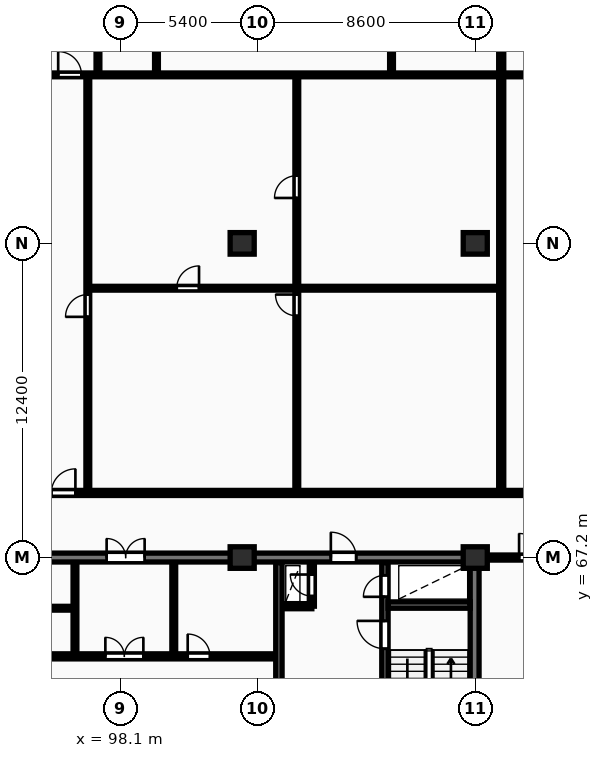
"""IFC4 building model, lengths in metres.
Left out: names, types, materials, properties, quantities, classifications, styles, units other than length and angle.
Written with IfcOpenShell. Run it as: python <this file> out.ifc"""

import sys

from ifc_helpers import new_model, si_unit, direction, frame, frame_2d, origin, origin_2d, place, context, subcontext, project, spatial, rectangle, extrude, element, fill, save


model = new_model("IFC4")
c1 = context("Model", 3, precision=1e-05, world=origin(), true_north=direction((0.0, 1.0)))
c2 = subcontext(c1, "Body", "Model", "MODEL_VIEW")
j1 = project(units=[si_unit("LENGTHUNIT", "METRE"), si_unit("PLANEANGLEUNIT", "RADIAN")], contexts=[c1])
p1 = place(None, origin())
s1 = spatial("IfcSite", under=j1, at=p1, CompositionType="ELEMENT")
p2 = place(p1, origin())
s2 = spatial("IfcBuilding", under=s1, at=p2, CompositionType="ELEMENT")
p3 = place(p2, frame((0.0, 0.0, 132.8)))
s3 = spatial("IfcBuildingStorey", under=s2, at=p3, CompositionType="ELEMENT", Elevation=132.8)
for number, where, z_axis, x_axis in (
    (1, (102.9, 67.2, 0.0), (0.0, 0.0, 1.0), (1.0, 0.0, 0.0)),
    (2, (102.9, 79.6, 0.0), (0.0, 0.0, 1.0), (1.0, 0.0, 0.0)),
    (3, (112.1, 67.2, 0.0), (0.0, 0.0, 1.0), (1.0, 0.0, 0.0)),
    (4, (112.1, 79.6, 0.0), (0.0, 0.0, 1.0), (1.0, 0.0, 0.0)),
):
    element("IfcColumn", number, at=place(p3, frame(where, z_axis=z_axis, x_axis=x_axis)), inside=s3, PredefinedType="COLUMN", context=c2, shape_type="SweptSolid", body=[
        extrude(rectangle(XDim=0.95, YDim=0.85, at=origin_2d()), origin(), (0.0, 0.0, 1.0), 3.25),
    ])
p4 = place(p3, frame((112.075, 55.375, 0.0), z_axis=(0.0, 0.0, 1.0), x_axis=(0.0, 1.0, 0.0)))
e5 = element("IfcWall", 5, at=p4, inside=s3, PredefinedType="SHEAR", context=c2, shape_type="SweptSolid", body=[
    extrude(rectangle(XDim=11.65, YDim=0.35, at=frame_2d((5.825, 0.0))), origin(), (0.0, 0.0, 1.0), 3.25),
])
p5 = place(p3, frame((75.95, 67.2, 0.0), z_axis=(0.0, 0.0, 1.0), x_axis=(1.0, 0.0, 0.0)))
e6 = element("IfcWall", 6, at=p5, inside=s3, PredefinedType="SHEAR", context=c2, shape_type="SweptSolid", body=[
    extrude(rectangle(XDim=36.3, YDim=0.35, at=frame_2d((18.15, 0.0))), origin(), (0.0, 0.0, 1.0), 3.25),
])
p6 = place(p5, frame((5.25, 0.0, 0.0)))
e7 = element("IfcOpeningElement", 7, at=p6, cuts=e6, PredefinedType="OPENING", context=c2, shape_type="SweptSolid", body=[
    extrude(rectangle(XDim=1.0, YDim=2.15, at=frame_2d((0.5, 1.075))), frame((0.0, 0.185, 0.0), z_axis=(0.0, -1.0, 0.0), x_axis=(1.0, 0.0, 0.0)), (0.0, 0.0, 1.0), 0.37),
])
p7 = place(p5, frame((21.6, 0.0, 0.0)))
e8 = element("IfcOpeningElement", 8, at=p7, cuts=e6, PredefinedType="OPENING", context=c2, shape_type="SweptSolid", body=[
    extrude(rectangle(XDim=1.5, YDim=2.2, at=frame_2d((0.75, 1.1))), frame((0.0, 0.185, 0.0), z_axis=(0.0, -1.0, 0.0), x_axis=(1.0, 0.0, 0.0)), (0.0, 0.0, 1.0), 0.37),
])
p8 = place(p5, frame((30.45, 0.0, 0.0)))
e9 = element("IfcOpeningElement", 9, at=p8, cuts=e6, PredefinedType="OPENING", context=c2, shape_type="SweptSolid", body=[
    extrude(rectangle(XDim=1.0, YDim=2.15, at=frame_2d((0.5, 1.075))), frame((0.0, 0.185, 0.0), z_axis=(0.0, -1.0, 0.0), x_axis=(1.0, 0.0, 0.0)), (0.0, 0.0, 1.0), 0.37),
])
p9 = place(p3, frame((89.25, 65.2, 0.0), z_axis=(0.0, 0.0, 1.0), x_axis=(1.0, 0.0, 0.0)))
e10 = element("IfcWall", 10, at=p9, inside=s3, PredefinedType="PARTITIONING", context=c2, shape_type="SweptSolid", body=[
    extrude(rectangle(XDim=7.05, YDim=0.15, at=frame_2d((3.525, 0.0))), origin(), (0.0, 0.0, 1.0), 2.97),
])
p10 = place(p9, frame((1.6, 0.0, 0.0)))
e11 = element("IfcOpeningElement", 11, at=p10, cuts=e10, PredefinedType="OPENING", context=c2, shape_type="SweptSolid", body=[
    extrude(rectangle(XDim=0.88, YDim=2.06, at=frame_2d((0.44, 1.03))), frame((0.0, 0.085, 0.0), z_axis=(0.0, -1.0, 0.0), x_axis=(1.0, 0.0, 0.0)), (0.0, 0.0, 1.0), 0.17),
])
for number, where, z_axis, x_axis in (
    (12, (96.3, 63.4, 0.0), (0.0, 0.0, 1.0), (0.0, 1.0, 0.0)),
    (13, (100.2, 63.4, 0.0), (0.0, 0.0, 1.0), (0.0, 1.0, 0.0)),
):
    element("IfcWall", number, at=place(p3, frame(where, z_axis=z_axis, x_axis=x_axis)), inside=s3, PredefinedType="PARTITIONING", context=c2, shape_type="SweptSolid", body=[
        extrude(rectangle(XDim=3.6, YDim=0.15, at=frame_2d((1.8, 0.0))), origin(), (0.0, 0.0, 1.0), 2.97),
    ])
p11 = place(p3, frame((84.42, 63.3, 0.0), z_axis=(0.0, 0.0, 1.0), x_axis=(1.0, 0.0, 0.0)))
e14 = element("IfcWall", 14, at=p11, inside=s3, PredefinedType="PARTITIONING", context=c2, shape_type="SweptSolid", body=[
    extrude(rectangle(XDim=19.83, YDim=0.2, at=frame_2d((9.915, 0.0))), origin(), (0.0, 0.0, 1.0), 2.97),
])
p12 = place(p11, frame((1.15, 0.0, 0.0)))
e15 = element("IfcOpeningElement", 15, at=p12, cuts=e14, PredefinedType="OPENING", context=c2, shape_type="SweptSolid", body=[
    extrude(rectangle(XDim=0.85, YDim=2.05, at=frame_2d((0.425, 1.025))), frame((0.0, 0.11, 0.0), z_axis=(0.0, -1.0, 0.0), x_axis=(1.0, 0.0, 0.0)), (0.0, 0.0, 1.0), 0.22),
])
p13 = place(p11, frame((3.25, 0.0, 0.0)))
e16 = element("IfcOpeningElement", 16, at=p13, cuts=e14, PredefinedType="OPENING", context=c2, shape_type="SweptSolid", body=[
    extrude(rectangle(XDim=0.85, YDim=2.05, at=frame_2d((0.425, 1.025))), frame((0.0, 0.11, 0.0), z_axis=(0.0, -1.0, 0.0), x_axis=(1.0, 0.0, 0.0)), (0.0, 0.0, 1.0), 0.22),
])
p14 = place(p11, frame((13.08, 0.0, 0.0)))
e17 = element("IfcOpeningElement", 17, at=p14, cuts=e14, PredefinedType="OPENING", context=c2, shape_type="SweptSolid", body=[
    extrude(rectangle(XDim=1.5, YDim=2.2, at=frame_2d((0.75, 1.1))), frame((0.0, 0.11, 0.0), z_axis=(0.0, -1.0, 0.0), x_axis=(1.0, 0.0, 0.0)), (0.0, 0.0, 1.0), 0.22),
])
p15 = place(p11, frame((6.68, 0.0, 0.0)))
e18 = element("IfcOpeningElement", 18, at=p15, cuts=e14, PredefinedType="OPENING", context=c2, shape_type="SweptSolid", body=[
    extrude(rectangle(XDim=0.92, YDim=2.08, at=frame_2d((0.46, 1.04))), frame((0.0, 0.11, 0.0), z_axis=(0.0, -1.0, 0.0), x_axis=(1.0, 0.0, 0.0)), (0.0, 0.0, 1.0), 0.22),
])
p16 = place(p11, frame((16.33, 0.0, 0.0)))
e19 = element("IfcOpeningElement", 19, at=p16, cuts=e14, PredefinedType="OPENING", context=c2, shape_type="SweptSolid", body=[
    extrude(rectangle(XDim=0.88, YDim=2.06, at=frame_2d((0.44, 1.03))), frame((0.0, 0.11, 0.0), z_axis=(0.0, -1.0, 0.0), x_axis=(1.0, 0.0, 0.0)), (0.0, 0.0, 1.0), 0.22),
])
p17 = place(p3, frame((104.45, 65.28, 0.0), z_axis=(0.0, 0.0, 1.0), x_axis=(1.0, 0.0, 0.0)))
e20 = element("IfcWall", 20, at=p17, inside=s3, PredefinedType="PARTITIONING", context=c2, shape_type="SweptSolid", body=[
    extrude(rectangle(XDim=1.2, YDim=0.2, at=frame_2d((0.6, 0.0))), origin(), (0.0, 0.0, 1.0), 2.97),
])
p18 = place(p3, frame((105.65, 65.28, 0.0), z_axis=(0.0, 0.0, 1.0), x_axis=(0.0, 1.0, 0.0)))
e21 = element("IfcWall", 21, at=p18, inside=s3, PredefinedType="PARTITIONING", context=c2, shape_type="SweptSolid", body=[
    extrude(rectangle(XDim=1.72, YDim=0.2, at=frame_2d((0.86, 0.0))), origin(), (0.0, 0.0, 1.0), 2.97),
])
p19 = place(p18, frame((0.4, 0.0, 0.0)))
e22 = element("IfcOpeningElement", 22, at=p19, cuts=e21, PredefinedType="OPENING", context=c2, shape_type="SweptSolid", body=[
    extrude(rectangle(XDim=0.85, YDim=2.05, at=frame_2d((0.425, 1.025))), frame((0.0, 0.11, 0.0), z_axis=(0.0, -1.0, 0.0), x_axis=(1.0, 0.0, 0.0)), (0.0, 0.0, 1.0), 0.22),
])
p20 = place(p3, frame((104.35, 58.4, 0.0), z_axis=(0.0, 0.0, 1.0), x_axis=(0.0, 1.0, 0.0)))
e23 = element("IfcWall", 23, at=p20, inside=s3, PredefinedType="SHEAR", context=c2, shape_type="SweptSolid", body=[
    extrude(rectangle(XDim=8.6, YDim=0.25, at=frame_2d((4.3, 0.0))), origin(), (0.0, 0.0, 1.0), 3.25),
])
p21 = place(p20, frame((1.8, 0.0, 0.0)))
e24 = element("IfcOpeningElement", 24, at=p21, cuts=e23, PredefinedType="OPENING", context=c2, shape_type="SweptSolid", body=[
    extrude(rectangle(XDim=1.1, YDim=2.1, at=frame_2d((0.55, 1.05))), frame((0.0, 0.135, 0.0), z_axis=(0.0, -1.0, 0.0), x_axis=(1.0, 0.0, 0.0)), (0.0, 0.0, 1.0), 0.27),
])
p22 = place(p3, frame((108.535, 55.4, 0.0), z_axis=(0.0, 0.0, 1.0), x_axis=(0.0, 1.0, 0.0)))
e25 = element("IfcWall", 25, at=p22, inside=s3, PredefinedType="SHEAR", context=c2, shape_type="SweptSolid", body=[
    extrude(rectangle(XDim=11.6, YDim=0.25, at=frame_2d((5.8, 0.0))), origin(), (0.0, 0.0, 1.0), 3.25),
])
p23 = place(p22, frame((8.2, 0.0, 0.0)))
e26 = element("IfcOpeningElement", 26, at=p23, cuts=e25, PredefinedType="OPENING", context=c2, shape_type="SweptSolid", body=[
    extrude(rectangle(XDim=1.1, YDim=2.1, at=frame_2d((0.55, 1.05))), frame((0.0, 0.135, 0.0), z_axis=(0.0, -1.0, 0.0), x_axis=(1.0, 0.0, 0.0)), (0.0, 0.0, 1.0), 0.27),
])
p24 = place(p22, frame((10.25, 0.0, 0.0)))
e27 = element("IfcOpeningElement", 27, at=p24, cuts=e25, PredefinedType="OPENING", context=c2, shape_type="SweptSolid", body=[
    extrude(rectangle(XDim=0.85, YDim=2.05, at=frame_2d((0.425, 1.025))), frame((0.0, 0.135, 0.0), z_axis=(0.0, -1.0, 0.0), x_axis=(1.0, 0.0, 0.0)), (0.0, 0.0, 1.0), 0.27),
])
p25 = place(p3, frame((108.66, 65.325, 0.0), z_axis=(0.0, 0.0, 1.0), x_axis=(1.0, 0.0, 0.0)))
e28 = element("IfcWall", 28, at=p25, inside=s3, PredefinedType="SHEAR", context=c2, shape_type="SweptSolid", body=[
    extrude(rectangle(XDim=3.24, YDim=0.25, at=frame_2d((1.62, 0.0))), origin(), (0.0, 0.0, 1.0), 3.25),
])
p26 = place(p3, frame((112.25, 67.2, 0.0), z_axis=(0.0, 0.0, 1.0), x_axis=(1.0, 0.0, 0.0)))
e29 = element("IfcWall", 29, at=p26, inside=s3, PredefinedType="PARTITIONING", context=c2, shape_type="SweptSolid", body=[
    extrude(rectangle(XDim=18.35, YDim=0.2, at=frame_2d((9.175, 0.0))), origin(), (0.0, 0.0, 1.0), 2.433),
])
p27 = place(p26, frame((1.58, 0.0, 0.0)))
e30 = element("IfcOpeningElement", 30, at=p27, cuts=e29, PredefinedType="OPENING", context=c2, shape_type="SweptSolid", body=[
    extrude(rectangle(XDim=0.95, YDim=2.15, at=frame_2d((0.475, 1.075))), frame((0.0, 0.11, 0.0), z_axis=(0.0, -1.0, 0.0), x_axis=(1.0, 0.0, 0.0)), (0.0, 0.0, 1.0), 0.22),
])
p28 = place(p3, frame((113.125, 69.83, 0.0), z_axis=(0.0, 0.0, 1.0), x_axis=(0.0, 1.0, 0.0)))
e31 = element("IfcWall", 31, at=p28, inside=s3, PredefinedType="PARTITIONING", context=c2, shape_type="SweptSolid", body=[
    extrude(rectangle(XDim=26.07, YDim=0.2, at=frame_2d((13.035, 0.0))), origin(), (0.0, 0.0, 1.0), 2.97),
])
p29 = place(p3, frame((105.056, 69.81, 0.0), z_axis=(0.0, 0.0, 1.0), x_axis=(0.0, 1.0, 0.0)))
e32 = element("IfcWall", 32, at=p29, inside=s3, PredefinedType="PARTITIONING", context=c2, shape_type="SweptSolid", body=[
    extrude(rectangle(XDim=16.4, YDim=0.15, at=frame_2d((8.2, 0.0))), origin(), (0.0, 0.0, 1.0), 2.97),
])
p30 = place(p29, frame((6.93, 0.0, 0.0)))
e33 = element("IfcOpeningElement", 33, at=p30, cuts=e32, PredefinedType="OPENING", context=c2, shape_type="SweptSolid", body=[
    extrude(rectangle(XDim=0.84, YDim=2.04, at=frame_2d((0.42, 1.02))), frame((0.0, 0.085, 0.0), z_axis=(0.0, -1.0, 0.0), x_axis=(1.0, 0.0, 0.0)), (0.0, 0.0, 1.0), 0.17),
])
p31 = place(p29, frame((11.582, 0.0, 0.0)))
e34 = element("IfcOpeningElement", 34, at=p31, cuts=e32, PredefinedType="OPENING", context=c2, shape_type="SweptSolid", body=[
    extrude(rectangle(XDim=0.88, YDim=2.06, at=frame_2d((0.44, 1.03))), frame((0.0, 0.085, 0.0), z_axis=(0.0, -1.0, 0.0), x_axis=(1.0, 0.0, 0.0)), (0.0, 0.0, 1.0), 0.17),
])
p32 = place(p3, frame((96.867, 77.83, 0.0), z_axis=(0.0, 0.0, 1.0), x_axis=(1.0, 0.0, 0.0)))
e35 = element("IfcWall", 35, at=p32, inside=s3, PredefinedType="PARTITIONING", context=c2, shape_type="SweptSolid", body=[
    extrude(rectangle(XDim=16.177, YDim=0.15, at=frame_2d((8.089, 0.0))), origin(), (0.0, 0.0, 1.0), 2.97),
])
p33 = place(p32, frame((3.45, 0.0, 0.0)))
e36 = element("IfcOpeningElement", 36, at=p33, cuts=e35, PredefinedType="OPENING", context=c2, shape_type="SweptSolid", body=[
    extrude(rectangle(XDim=0.88, YDim=2.06, at=frame_2d((0.44, 1.03))), frame((0.0, 0.085, 0.0), z_axis=(0.0, -1.0, 0.0), x_axis=(1.0, 0.0, 0.0)), (0.0, 0.0, 1.0), 0.17),
])
p34 = place(p3, frame((96.808, 69.81, 0.0), z_axis=(0.0, 0.0, 1.0), x_axis=(0.0, 1.0, 0.0)))
e37 = element("IfcWall", 37, at=p34, inside=s3, PredefinedType="PARTITIONING", context=c2, shape_type="SweptSolid", body=[
    extrude(rectangle(XDim=16.4, YDim=0.15, at=frame_2d((8.2, 0.0))), origin(), (0.0, 0.0, 1.0), 2.97),
])
p35 = place(p34, frame((6.89, 0.0, 0.0)))
e38 = element("IfcOpeningElement", 38, at=p35, cuts=e37, PredefinedType="OPENING", context=c2, shape_type="SweptSolid", body=[
    extrude(rectangle(XDim=0.88, YDim=2.06, at=frame_2d((0.44, 1.03))), frame((0.0, 0.085, 0.0), z_axis=(0.0, -1.0, 0.0), x_axis=(1.0, 0.0, 0.0)), (0.0, 0.0, 1.0), 0.17),
])
p36 = place(p3, frame((99.518, 86.29, 0.0), z_axis=(0.0, 0.0, 1.0), x_axis=(0.0, 1.0, 0.0)))
e39 = element("IfcWall", 39, at=p36, inside=s3, PredefinedType="PARTITIONING", context=c2, shape_type="SweptSolid", body=[
    extrude(rectangle(XDim=2.69, YDim=0.15, at=frame_2d((1.345, 0.0))), origin(), (0.0, 0.0, 1.0), 2.97),
])
p37 = place(p3, frame((97.208, 86.29, 0.0), z_axis=(0.0, 0.0, 1.0), x_axis=(0.0, 1.0, 0.0)))
e40 = element("IfcWall", 40, at=p37, inside=s3, PredefinedType="PARTITIONING", context=c2, shape_type="SweptSolid", body=[
    extrude(rectangle(XDim=9.61, YDim=0.15, at=frame_2d((4.805, 0.0))), origin(), (0.0, 0.0, 1.0), 2.97),
])
p38 = place(p37, frame((3.82, 0.0, 0.0)))
e41 = element("IfcOpeningElement", 41, at=p38, cuts=e40, PredefinedType="OPENING", context=c2, shape_type="SweptSolid", body=[
    extrude(rectangle(XDim=0.92, YDim=2.08, at=frame_2d((0.46, 1.04))), frame((0.0, 0.085, 0.0), z_axis=(0.0, -1.0, 0.0), x_axis=(1.0, 0.0, 0.0)), (0.0, 0.0, 1.0), 0.17),
])
p39 = place(p3, frame((108.795, 86.29, 0.0), z_axis=(0.0, 0.0, 1.0), x_axis=(0.0, 1.0, 0.0)))
e42 = element("IfcWall", 42, at=p39, inside=s3, PredefinedType="PARTITIONING", context=c2, shape_type="SweptSolid", body=[
    extrude(rectangle(XDim=2.69, YDim=0.15, at=frame_2d((1.345, 0.0))), origin(), (0.0, 0.0, 1.0), 2.97),
])
p40 = place(p3, frame((92.917, 86.25, 0.0), z_axis=(0.0, 0.0, 1.0), x_axis=(1.0, 0.0, 0.0)))
e43 = element("IfcWall", 43, at=p40, inside=s3, PredefinedType="PARTITIONING", context=c2, shape_type="SweptSolid", body=[
    extrude(rectangle(XDim=20.127, YDim=0.15, at=frame_2d((10.064, 0.0))), origin(), (0.0, 0.0, 1.0), 2.97),
])
p41 = place(p40, frame((2.72, 0.0, 0.0)))
e44 = element("IfcOpeningElement", 44, at=p41, cuts=e43, PredefinedType="OPENING", context=c2, shape_type="SweptSolid", body=[
    extrude(rectangle(XDim=0.92, YDim=2.08, at=frame_2d((0.46, 1.04))), frame((0.0, 0.085, 0.0), z_axis=(0.0, -1.0, 0.0), x_axis=(1.0, 0.0, 0.0)), (0.0, 0.0, 1.0), 0.17),
])
p42 = place(p3, frame((113.205, 86.25, 0.0), z_axis=(0.0, 0.0, 1.0), x_axis=(1.0, 0.0, 0.0)))
e45 = element("IfcWall", 45, at=p42, inside=s3, PredefinedType="PARTITIONING", context=c2, shape_type="SweptSolid", body=[
    extrude(rectangle(XDim=17.315, YDim=0.15, at=frame_2d((8.657, 0.0))), origin(), (0.0, 0.0, 1.0), 2.97),
])
p43 = place(p42, frame((2.72, 0.0, 0.0)))
e46 = element("IfcOpeningElement", 46, at=p43, cuts=e45, PredefinedType="OPENING", context=c2, shape_type="SweptSolid", body=[
    extrude(rectangle(XDim=0.92, YDim=2.08, at=frame_2d((0.46, 1.04))), frame((0.0, 0.085, 0.0), z_axis=(0.0, -1.0, 0.0), x_axis=(1.0, 0.0, 0.0)), (0.0, 0.0, 1.0), 0.17),
])
p44 = place(p3, frame((57.6, 69.75, 0.0), z_axis=(0.0, 0.0, 1.0), x_axis=(1.0, 0.0, 0.0)))
e47 = element("IfcWall", 47, at=p44, inside=s3, PredefinedType="PARTITIONING", context=c2, shape_type="SweptSolid", body=[
    extrude(rectangle(XDim=73.0, YDim=0.2, at=frame_2d((36.5, 0.0))), origin(), (0.0, 0.0, 1.0), 2.97),
])
p45 = place(p44, frame((6.629, 0.0, 0.0)))
e48 = element("IfcOpeningElement", 48, at=p45, cuts=e47, PredefinedType="OPENING", context=c2, shape_type="SweptSolid", body=[
    extrude(rectangle(XDim=1.22, YDim=2.18, at=frame_2d((0.61, 1.09))), frame((0.0, 0.11, 0.0), z_axis=(0.0, -1.0, 0.0), x_axis=(1.0, 0.0, 0.0)), (0.0, 0.0, 1.0), 0.22),
])
p46 = place(p44, frame((24.022, 0.0, 0.0)))
e49 = element("IfcOpeningElement", 49, at=p46, cuts=e47, PredefinedType="OPENING", context=c2, shape_type="SweptSolid", body=[
    extrude(rectangle(XDim=1.22, YDim=2.18, at=frame_2d((0.61, 1.09))), frame((0.0, 0.11, 0.0), z_axis=(0.0, -1.0, 0.0), x_axis=(1.0, 0.0, 0.0)), (0.0, 0.0, 1.0), 0.22),
])
p47 = place(p44, frame((37.768, 0.0, 0.0)))
e50 = element("IfcOpeningElement", 50, at=p47, cuts=e47, PredefinedType="OPENING", context=c2, shape_type="SweptSolid", body=[
    extrude(rectangle(XDim=0.95, YDim=2.15, at=frame_2d((0.475, 1.075))), frame((0.0, 0.11, 0.0), z_axis=(0.0, -1.0, 0.0), x_axis=(1.0, 0.0, 0.0)), (0.0, 0.0, 1.0), 0.22),
])
p48 = place(p44, frame((57.57, 0.0, 0.0)))
e51 = element("IfcOpeningElement", 51, at=p48, cuts=e47, PredefinedType="OPENING", context=c2, shape_type="SweptSolid", body=[
    extrude(rectangle(XDim=0.95, YDim=2.15, at=frame_2d((0.475, 1.075))), frame((0.0, 0.11, 0.0), z_axis=(0.0, -1.0, 0.0), x_axis=(1.0, 0.0, 0.0)), (0.0, 0.0, 1.0), 0.22),
])
p49 = place(p7, origin())
e52 = element("IfcDoor", 52, at=p49, inside=s3, OperationType="DOUBLE_DOOR_SINGLE_SWING", PredefinedType="DOOR", context=c2, shape_type="SweptSolid", body=[
    extrude(rectangle(XDim=1.5, YDim=2.2, at=frame_2d((0.75, 1.1))), frame((0.0, 0.025, 0.0), z_axis=(0.0, -1.0, 0.0), x_axis=(1.0, 0.0, 0.0)), (0.0, 0.0, 1.0), 0.05),
])
fill(e8, e52)
p50 = place(p8, origin())
e53 = element("IfcDoor", 53, at=p50, inside=s3, OperationType="SINGLE_SWING_LEFT", PredefinedType="DOOR", context=c2, shape_type="SweptSolid", body=[
    extrude(rectangle(XDim=1.0, YDim=2.15, at=frame_2d((0.5, 1.075))), frame((0.0, 0.025, 0.0), z_axis=(0.0, -1.0, 0.0), x_axis=(1.0, 0.0, 0.0)), (0.0, 0.0, 1.0), 0.05),
])
fill(e9, e53)
p51 = place(p14, origin())
e54 = element("IfcDoor", 54, at=p51, inside=s3, OperationType="DOUBLE_DOOR_SINGLE_SWING", PredefinedType="DOOR", context=c2, shape_type="SweptSolid", body=[
    extrude(rectangle(XDim=1.5, YDim=2.2, at=frame_2d((0.75, 1.1))), frame((0.0, 0.025, 0.0), z_axis=(0.0, -1.0, 0.0), x_axis=(1.0, 0.0, 0.0)), (0.0, 0.0, 1.0), 0.05),
])
fill(e17, e54)
p52 = place(p16, origin())
e55 = element("IfcDoor", 55, at=p52, inside=s3, OperationType="SINGLE_SWING_LEFT", PredefinedType="DOOR", context=c2, shape_type="SweptSolid", body=[
    extrude(rectangle(XDim=0.88, YDim=2.06, at=frame_2d((0.44, 1.03))), frame((0.0, 0.025, 0.0), z_axis=(0.0, -1.0, 0.0), x_axis=(1.0, 0.0, 0.0)), (0.0, 0.0, 1.0), 0.05),
])
fill(e19, e55)
p53 = place(p19, origin())
e56 = element("IfcDoor", 56, at=p53, inside=s3, OperationType="SINGLE_SWING_RIGHT", PredefinedType="DOOR", context=c2, shape_type="SweptSolid", body=[
    extrude(rectangle(XDim=0.85, YDim=2.05, at=frame_2d((0.425, 1.025))), frame((0.0, 0.025, 0.0), z_axis=(0.0, -1.0, 0.0), x_axis=(1.0, 0.0, 0.0)), (0.0, 0.0, 1.0), 0.05),
])
fill(e22, e56)
p54 = place(p23, origin())
e57 = element("IfcDoor", 57, at=p54, inside=s3, OperationType="SINGLE_SWING_RIGHT", PredefinedType="DOOR", context=c2, shape_type="SweptSolid", body=[
    extrude(rectangle(XDim=1.1, YDim=2.1, at=frame_2d((0.55, 1.05))), frame((0.0, 0.025, 0.0), z_axis=(0.0, -1.0, 0.0), x_axis=(1.0, 0.0, 0.0)), (0.0, 0.0, 1.0), 0.05),
])
fill(e26, e57)
p55 = place(p24, origin())
e58 = element("IfcDoor", 58, at=p55, inside=s3, OperationType="SINGLE_SWING_LEFT", PredefinedType="DOOR", context=c2, shape_type="SweptSolid", body=[
    extrude(rectangle(XDim=0.85, YDim=2.05, at=frame_2d((0.425, 1.025))), frame((0.0, 0.025, 0.0), z_axis=(0.0, -1.0, 0.0), x_axis=(1.0, 0.0, 0.0)), (0.0, 0.0, 1.0), 0.05),
])
fill(e27, e58)
p56 = place(p27, origin())
e59 = element("IfcDoor", 59, at=p56, inside=s3, OperationType="SINGLE_SWING_LEFT", PredefinedType="DOOR", context=c2, shape_type="SweptSolid", body=[
    extrude(rectangle(XDim=0.95, YDim=2.15, at=frame_2d((0.475, 1.075))), frame((0.0, 0.025, 0.0), z_axis=(0.0, -1.0, 0.0), x_axis=(1.0, 0.0, 0.0)), (0.0, 0.0, 1.0), 0.05),
])
fill(e30, e59)
p57 = place(p30, origin())
e60 = element("IfcDoor", 60, at=p57, inside=s3, OperationType="SINGLE_SWING_RIGHT", PredefinedType="DOOR", context=c2, shape_type="SweptSolid", body=[
    extrude(rectangle(XDim=0.84, YDim=2.04, at=frame_2d((0.42, 1.02))), frame((0.0, 0.025, 0.0), z_axis=(0.0, -1.0, 0.0), x_axis=(1.0, 0.0, 0.0)), (0.0, 0.0, 1.0), 0.05),
])
fill(e33, e60)
p58 = place(p31, origin())
e61 = element("IfcDoor", 61, at=p58, inside=s3, OperationType="SINGLE_SWING_LEFT", PredefinedType="DOOR", context=c2, shape_type="SweptSolid", body=[
    extrude(rectangle(XDim=0.88, YDim=2.06, at=frame_2d((0.44, 1.03))), frame((0.0, 0.025, 0.0), z_axis=(0.0, -1.0, 0.0), x_axis=(1.0, 0.0, 0.0)), (0.0, 0.0, 1.0), 0.05),
])
fill(e34, e61)
p59 = place(p33, origin())
e62 = element("IfcDoor", 62, at=p59, inside=s3, OperationType="SINGLE_SWING_RIGHT", PredefinedType="DOOR", context=c2, shape_type="SweptSolid", body=[
    extrude(rectangle(XDim=0.88, YDim=2.06, at=frame_2d((0.44, 1.03))), frame((0.0, 0.025, 0.0), z_axis=(0.0, -1.0, 0.0), x_axis=(1.0, 0.0, 0.0)), (0.0, 0.0, 1.0), 0.05),
])
fill(e36, e62)
p60 = place(p35, origin())
e63 = element("IfcDoor", 63, at=p60, inside=s3, OperationType="SINGLE_SWING_LEFT", PredefinedType="DOOR", context=c2, shape_type="SweptSolid", body=[
    extrude(rectangle(XDim=0.88, YDim=2.06, at=frame_2d((0.44, 1.03))), frame((0.0, 0.025, 0.0), z_axis=(0.0, -1.0, 0.0), x_axis=(1.0, 0.0, 0.0)), (0.0, 0.0, 1.0), 0.05),
])
fill(e38, e63)
p61 = place(p41, origin())
e64 = element("IfcDoor", 64, at=p61, inside=s3, OperationType="SINGLE_SWING_LEFT", PredefinedType="DOOR", context=c2, shape_type="SweptSolid", body=[
    extrude(rectangle(XDim=0.92, YDim=2.08, at=frame_2d((0.46, 1.04))), frame((0.0, 0.025, 0.0), z_axis=(0.0, -1.0, 0.0), x_axis=(1.0, 0.0, 0.0)), (0.0, 0.0, 1.0), 0.05),
])
fill(e44, e64)
p62 = place(p47, origin())
e65 = element("IfcDoor", 65, at=p62, inside=s3, OperationType="SINGLE_SWING_RIGHT", PredefinedType="DOOR", context=c2, shape_type="SweptSolid", body=[
    extrude(rectangle(XDim=0.95, YDim=2.15, at=frame_2d((0.475, 1.075))), frame((0.0, 0.025, 0.0), z_axis=(0.0, -1.0, 0.0), x_axis=(1.0, 0.0, 0.0)), (0.0, 0.0, 1.0), 0.05),
])
fill(e50, e65)
save(model, sys.argv[1])
